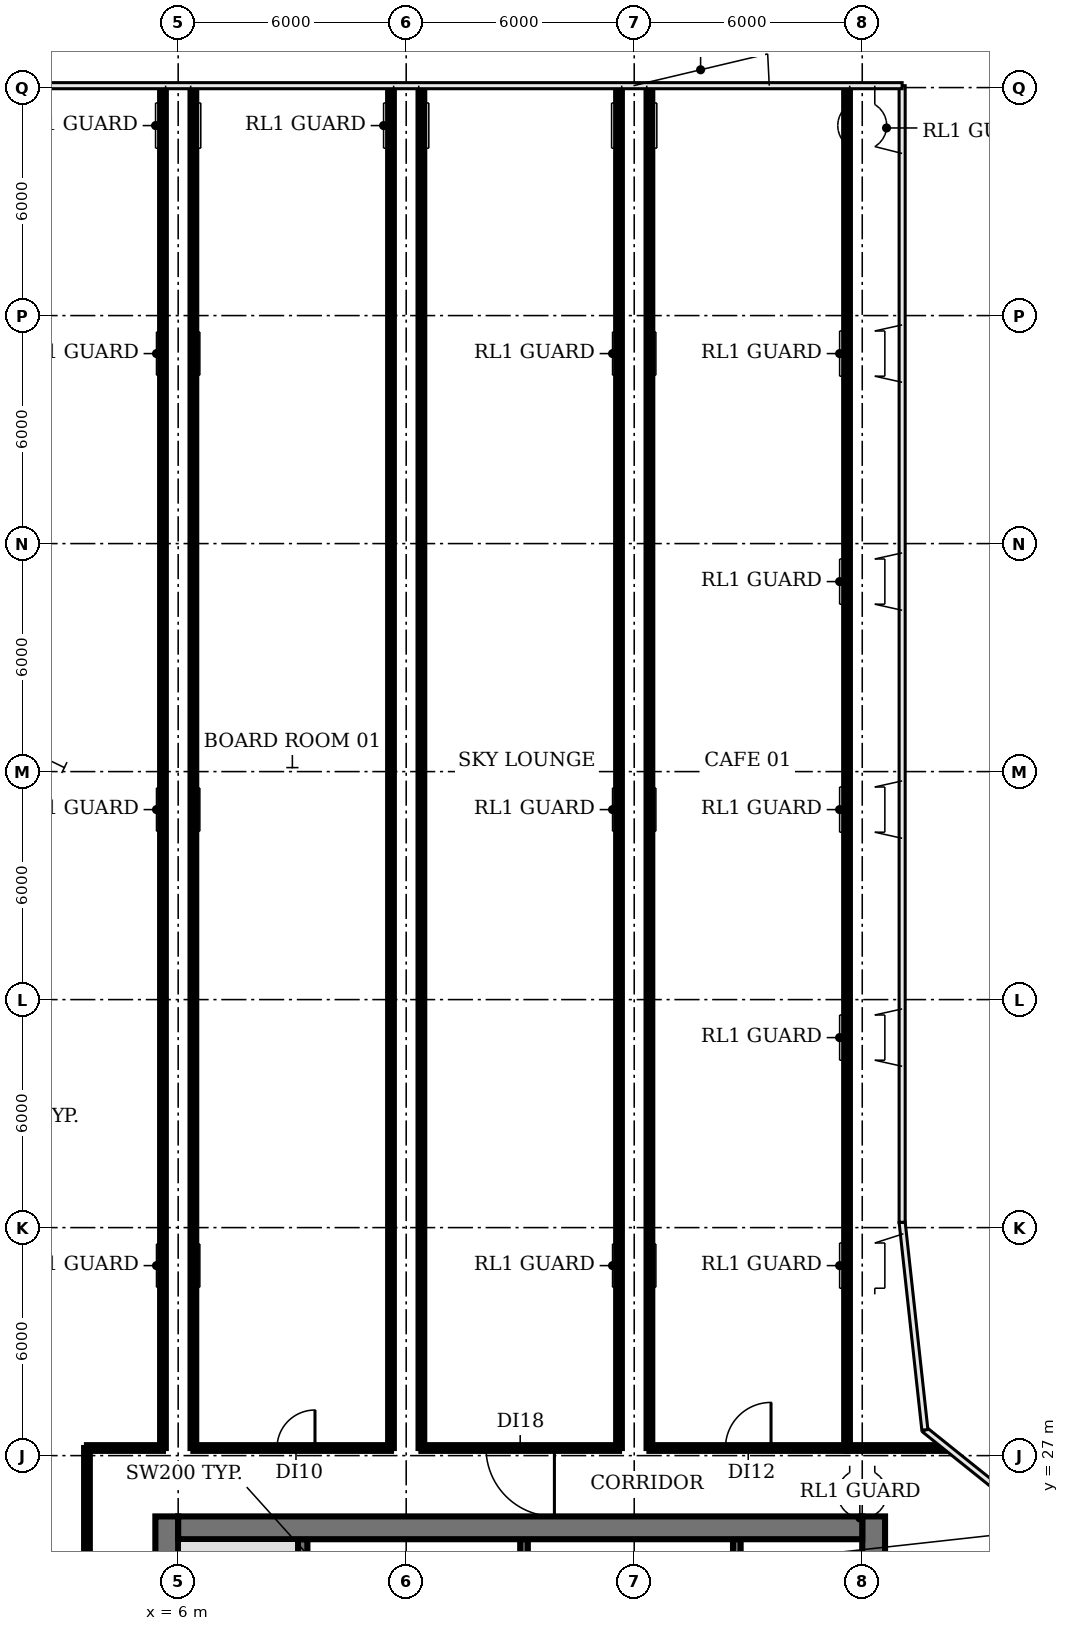
"""IFC4 building model, lengths in metres.
Left out: names, types, materials, properties, quantities, classifications, styles, units other than length and angle.
Written with IfcOpenShell. Run it as: python <this file> out.ifc"""

import sys

from ifc_helpers import new_model, si_unit, direction, frame, frame_2d, origin, place, context, subcontext, project, spatial, rectangle, extrude, element, fill, save


model = new_model("IFC4")
c1 = context("Model", 3, precision=1e-05, world=origin(), true_north=direction((0.0, 1.0)))
c2 = subcontext(c1, "Body", "Model", "MODEL_VIEW")
j1 = project(units=[si_unit("LENGTHUNIT", "METRE"), si_unit("PLANEANGLEUNIT", "RADIAN")], contexts=[c1])
p1 = place(None, origin())
s1 = spatial("IfcSite", under=j1, at=p1, CompositionType="ELEMENT")
p2 = place(p1, origin())
s2 = spatial("IfcBuilding", under=s1, at=p2, CompositionType="ELEMENT")
p3 = place(p2, frame((0.0, 0.0, 197.0)))
s3 = spatial("IfcBuildingStorey", under=s2, at=p3, CompositionType="ELEMENT", Elevation=197.0)
p4 = place(p3, frame((9.275, 18.375, 0.0), z_axis=(0.0, 0.0, 1.0), x_axis=(0.0, 1.0, 0.0)))
e1 = element("IfcWall", 1, at=p4, inside=s3, PredefinedType="SHEAR", context=c2, shape_type="SweptSolid", body=[
    extrude(rectangle(XDim=6.425, YDim=0.25, at=frame_2d((3.212, 0.0))), origin(), (0.0, 0.0, 1.0), 8.05),
])
for number, where, z_axis, x_axis in (
    (2, (15.1, 22.9, 0.0), (0.0, 0.0, 1.0), (0.0, 1.0, 0.0)),
    (3, (20.7, 22.9, 0.0), (0.0, 0.0, 1.0), (0.0, 1.0, 0.0)),
):
    element("IfcWall", number, at=place(p3, frame(where, z_axis=z_axis, x_axis=x_axis)), inside=s3, PredefinedType="SHEAR", context=c2, shape_type="SweptSolid", body=[
        extrude(rectangle(XDim=1.9, YDim=0.2, at=frame_2d((0.95, 0.0))), origin(), (0.0, 0.0, 1.0), 8.05),
    ])
p5 = place(p3, frame((5.7, 4.8, 0.0), z_axis=(0.0, 0.0, 1.0), x_axis=(0.0, 1.0, 0.0)))
e4 = element("IfcWall", 4, at=p5, inside=s3, PredefinedType="SHEAR", context=c2, shape_type="SweptSolid", body=[
    extrude(rectangle(XDim=20.6, YDim=0.6, at=frame_2d((10.3, 0.0))), origin(), (0.0, 0.0, 1.0), 8.05),
])
p6 = place(p5, frame((0.85, 0.0, 0.0)))
e5 = element("IfcOpeningElement", 5, at=p6, cuts=e4, PredefinedType="OPENING", context=c2, shape_type="SweptSolid", body=[
    extrude(rectangle(XDim=1.5, YDim=2.1, at=frame_2d((0.75, 1.05))), frame((0.0, 0.31, 0.0), z_axis=(0.0, -1.0, 0.0), x_axis=(1.0, 0.0, 0.0)), (0.0, 0.0, 1.0), 0.62),
])
p7 = place(p5, frame((7.3, 0.0, 0.0)))
e6 = element("IfcOpeningElement", 6, at=p7, cuts=e4, PredefinedType="OPENING", context=c2, shape_type="SweptSolid", body=[
    extrude(rectangle(XDim=1.2, YDim=2.1, at=frame_2d((0.6, 1.05))), frame((0.0, 0.31, 0.0), z_axis=(0.0, -1.0, 0.0), x_axis=(1.0, 0.0, 0.0)), (0.0, 0.0, 1.0), 0.62),
])
p8 = place(p5, frame((13.85, 0.0, 0.0)))
e7 = element("IfcOpeningElement", 7, at=p8, cuts=e4, PredefinedType="OPENING", context=c2, shape_type="SweptSolid", body=[
    extrude(rectangle(XDim=1.2, YDim=2.1, at=frame_2d((0.6, 1.05))), frame((0.0, 0.31, 0.0), z_axis=(0.0, -1.0, 0.0), x_axis=(1.0, 0.0, 0.0)), (0.0, 0.0, 1.0), 0.62),
])
p9 = place(p3, frame((24.3, 25.4, 0.0), z_axis=(0.0, 0.0, 1.0), x_axis=(0.0, -1.0, 0.0)))
e8 = element("IfcWall", 8, at=p9, inside=s3, PredefinedType="SHEAR", context=c2, shape_type="SweptSolid", body=[
    extrude(rectangle(XDim=20.6, YDim=0.6, at=frame_2d((10.3, 0.0))), origin(), (0.0, 0.0, 1.0), 8.05),
])
p10 = place(p9, frame((18.25, 0.0, 0.0)))
e9 = element("IfcOpeningElement", 9, at=p10, cuts=e8, PredefinedType="OPENING", context=c2, shape_type="SweptSolid", body=[
    extrude(rectangle(XDim=1.5, YDim=2.1, at=frame_2d((0.75, 1.05))), frame((0.0, 0.31, 0.0), z_axis=(0.0, -1.0, 0.0), x_axis=(1.0, 0.0, 0.0)), (0.0, 0.0, 1.0), 0.62),
])
p11 = place(p9, frame((12.15, 0.0, 0.0)))
e10 = element("IfcOpeningElement", 10, at=p11, cuts=e8, PredefinedType="OPENING", context=c2, shape_type="SweptSolid", body=[
    extrude(rectangle(XDim=0.9, YDim=2.1, at=frame_2d((0.45, 1.05))), frame((0.0, 0.31, 0.0), z_axis=(0.0, -1.0, 0.0), x_axis=(1.0, 0.0, 0.0)), (0.0, 0.0, 1.0), 0.62),
])
p12 = place(p9, frame((6.15, 0.0, 0.0)))
e11 = element("IfcOpeningElement", 11, at=p12, cuts=e8, PredefinedType="OPENING", context=c2, shape_type="SweptSolid", body=[
    extrude(rectangle(XDim=2.0, YDim=2.1, at=frame_2d((1.0, 1.05))), frame((0.0, 0.31, 0.0), z_axis=(0.0, -1.0, 0.0), x_axis=(1.0, 0.0, 0.0)), (0.0, 0.0, 1.0), 0.62),
])
p13 = place(p3, frame((6.0, 25.1, 0.0), z_axis=(0.0, 0.0, 1.0), x_axis=(1.0, 0.0, 0.0)))
e12 = element("IfcWall", 12, at=p13, inside=s3, PredefinedType="SHEAR", context=c2, shape_type="SweptSolid", body=[
    extrude(rectangle(XDim=18.0, YDim=0.6, at=frame_2d((9.0, 0.0))), origin(), (0.0, 0.0, 1.0), 8.05),
])
p14 = place(p3, frame((3.6, 22.5, 0.0), z_axis=(0.0, 0.0, 1.0), x_axis=(0.0, 1.0, 0.0)))
e13 = element("IfcWall", 13, at=p14, inside=s3, PredefinedType="PARTITIONING", context=c2, shape_type="SweptSolid", body=[
    extrude(rectangle(XDim=4.7, YDim=0.15, at=frame_2d((2.35, 0.0))), origin(), (0.0, 0.0, 1.0), 6.33),
])
p15 = place(p3, frame((3.6, 27.2, 0.0), z_axis=(0.0, 0.0, 1.0), x_axis=(1.0, 0.0, 0.0)))
e14 = element("IfcWall", 14, at=p15, inside=s3, PredefinedType="PARTITIONING", context=c2, shape_type="SweptSolid", body=[
    extrude(rectangle(XDim=2.0, YDim=0.15, at=frame_2d((1.0, 0.0))), origin(), (0.0, 0.0, 1.0), 6.33),
])
p16 = place(p3, frame((5.6, 27.2, 0.0), z_axis=(0.0, 0.0, 1.0), x_axis=(0.0, 1.0, 0.0)))
e15 = element("IfcWall", 15, at=p16, inside=s3, PredefinedType="PARTITIONING", context=c2, shape_type="SweptSolid", body=[
    extrude(rectangle(XDim=35.765, YDim=0.15, at=frame_2d((17.883, 0.0))), origin(), (0.0, 0.0, 1.0), 6.33),
])
p17 = place(p3, frame((6.4, 27.2, 0.0), z_axis=(0.0, 0.0, 1.0), x_axis=(0.0, 1.0, 0.0)))
e16 = element("IfcWall", 16, at=p17, inside=s3, PredefinedType="PARTITIONING", context=c2, shape_type="SweptSolid", body=[
    extrude(rectangle(XDim=35.8, YDim=0.15, at=frame_2d((17.9, 0.0))), origin(), (0.0, 0.0, 1.0), 6.33),
])
p18 = place(p3, frame((6.4, 27.2, 0.0), z_axis=(0.0, 0.0, 1.0), x_axis=(1.0, 0.0, 0.0)))
e17 = element("IfcWall", 17, at=p18, inside=s3, PredefinedType="PARTITIONING", context=c2, shape_type="SweptSolid", body=[
    extrude(rectangle(XDim=5.2, YDim=0.15, at=frame_2d((2.6, 0.0))), origin(), (0.0, 0.0, 1.0), 6.33),
])
p19 = place(p18, frame((2.2, 0.0, 0.0)))
e18 = element("IfcOpeningElement", 18, at=p19, cuts=e17, PredefinedType="OPENING", context=c2, shape_type="SweptSolid", body=[
    extrude(rectangle(XDim=1.0, YDim=2.1, at=frame_2d((0.5, 1.05))), frame((0.0, 0.085, 0.0), z_axis=(0.0, -1.0, 0.0), x_axis=(1.0, 0.0, 0.0)), (0.0, 0.0, 1.0), 0.17),
])
for number, where, z_axis, x_axis in (
    (19, (11.6, 27.2, 0.0), (0.0, 0.0, 1.0), (0.0, 1.0, 0.0)),
    (20, (12.4, 27.2, 0.0), (0.0, 0.0, 1.0), (0.0, 1.0, 0.0)),
):
    element("IfcWall", number, at=place(p3, frame(where, z_axis=z_axis, x_axis=x_axis)), inside=s3, PredefinedType="PARTITIONING", context=c2, shape_type="SweptSolid", body=[
        extrude(rectangle(XDim=35.8, YDim=0.15, at=frame_2d((17.9, 0.0))), origin(), (0.0, 0.0, 1.0), 6.33),
    ])
p20 = place(p3, frame((17.6, 27.2, 0.0), z_axis=(0.0, 0.0, 1.0), x_axis=(-1.0, 0.0, 0.0)))
e21 = element("IfcWall", 21, at=p20, inside=s3, PredefinedType="PARTITIONING", context=c2, shape_type="SweptSolid", body=[
    extrude(rectangle(XDim=5.2, YDim=0.15, at=frame_2d((2.6, 0.0))), origin(), (0.0, 0.0, 1.0), 6.33),
])
p21 = place(p20, frame((1.7, 0.0, 0.0)))
e22 = element("IfcOpeningElement", 22, at=p21, cuts=e21, PredefinedType="OPENING", context=c2, shape_type="SweptSolid", body=[
    extrude(rectangle(XDim=1.8, YDim=2.1, at=frame_2d((0.9, 1.05))), frame((0.0, 0.085, 0.0), z_axis=(0.0, -1.0, 0.0), x_axis=(1.0, 0.0, 0.0)), (0.0, 0.0, 1.0), 0.17),
])
p22 = place(p3, frame((17.6, 27.2, 0.0), z_axis=(0.0, 0.0, 1.0), x_axis=(0.0, 1.0, 0.0)))
e23 = element("IfcWall", 23, at=p22, inside=s3, PredefinedType="PARTITIONING", context=c2, shape_type="SweptSolid", body=[
    extrude(rectangle(XDim=35.8, YDim=0.15, at=frame_2d((17.9, 0.0))), origin(), (0.0, 0.0, 1.0), 6.33),
])
p23 = place(p3, frame((18.4, 27.2, 0.0), z_axis=(0.0, 0.0, 1.0), x_axis=(0.0, 1.0, 0.0)))
e24 = element("IfcWall", 24, at=p23, inside=s3, PredefinedType="PARTITIONING", context=c2, shape_type="SweptSolid", body=[
    extrude(rectangle(XDim=35.765, YDim=0.15, at=frame_2d((17.883, 0.0))), origin(), (0.0, 0.0, 1.0), 6.33),
])
p24 = place(p3, frame((18.4, 27.2, 0.0), z_axis=(0.0, 0.0, 1.0), x_axis=(1.0, 0.0, 0.0)))
e25 = element("IfcWall", 25, at=p24, inside=s3, PredefinedType="PARTITIONING", context=c2, shape_type="SweptSolid", body=[
    extrude(rectangle(XDim=5.2, YDim=0.15, at=frame_2d((2.6, 0.0))), origin(), (0.0, 0.0, 1.0), 6.33),
])
p25 = place(p24, frame((2.0, 0.0, 0.0)))
e26 = element("IfcOpeningElement", 26, at=p25, cuts=e25, PredefinedType="OPENING", context=c2, shape_type="SweptSolid", body=[
    extrude(rectangle(XDim=1.2, YDim=2.1, at=frame_2d((0.6, 1.05))), frame((0.0, 0.085, 0.0), z_axis=(0.0, -1.0, 0.0), x_axis=(1.0, 0.0, 0.0)), (0.0, 0.0, 1.0), 0.17),
])
p26 = place(p3, frame((23.6, 27.2, 0.0), z_axis=(0.0, 0.0, 1.0), x_axis=(0.0, 1.0, 0.0)))
e27 = element("IfcWall", 27, at=p26, inside=s3, PredefinedType="PARTITIONING", context=c2, shape_type="SweptSolid", body=[
    extrude(rectangle(XDim=35.8, YDim=0.15, at=frame_2d((17.9, 0.0))), origin(), (0.0, 0.0, 1.0), 6.33),
])
p27 = place(p3, frame((23.6, 27.2, 0.0), z_axis=(0.0, 0.0, 1.0), x_axis=(1.0, 0.0, 0.0)))
e28 = element("IfcWall", 28, at=p27, inside=s3, PredefinedType="PARTITIONING", context=c2, shape_type="SweptSolid", body=[
    extrude(rectangle(XDim=2.56, YDim=0.15, at=frame_2d((1.28, 0.0))), origin(), (0.0, 0.0, 1.0), 6.33),
])
p28 = place(p19, origin())
e29 = element("IfcDoor", 29, at=p28, inside=s3, OperationType="SINGLE_SWING_RIGHT", PredefinedType="DOOR", context=c2, shape_type="SweptSolid", body=[
    extrude(rectangle(XDim=1.0, YDim=2.1, at=frame_2d((0.5, 1.05))), frame((0.0, 0.025, 0.0), z_axis=(0.0, -1.0, 0.0), x_axis=(1.0, 0.0, 0.0)), (0.0, 0.0, 1.0), 0.05),
])
fill(e18, e29)
p29 = place(p21, origin())
e30 = element("IfcDoor", 30, at=p29, inside=s3, OperationType="SINGLE_SWING_LEFT", PredefinedType="DOOR", context=c2, shape_type="SweptSolid", body=[
    extrude(rectangle(XDim=1.8, YDim=2.1, at=frame_2d((0.9, 1.05))), frame((0.0, 0.025, 0.0), z_axis=(0.0, -1.0, 0.0), x_axis=(1.0, 0.0, 0.0)), (0.0, 0.0, 1.0), 0.05),
])
fill(e22, e30)
p30 = place(p25, origin())
e31 = element("IfcDoor", 31, at=p30, inside=s3, OperationType="SINGLE_SWING_RIGHT", PredefinedType="DOOR", context=c2, shape_type="SweptSolid", body=[
    extrude(rectangle(XDim=1.2, YDim=2.1, at=frame_2d((0.6, 1.05))), frame((0.0, 0.025, 0.0), z_axis=(0.0, -1.0, 0.0), x_axis=(1.0, 0.0, 0.0)), (0.0, 0.0, 1.0), 0.05),
])
fill(e26, e31)
save(model, sys.argv[1])
